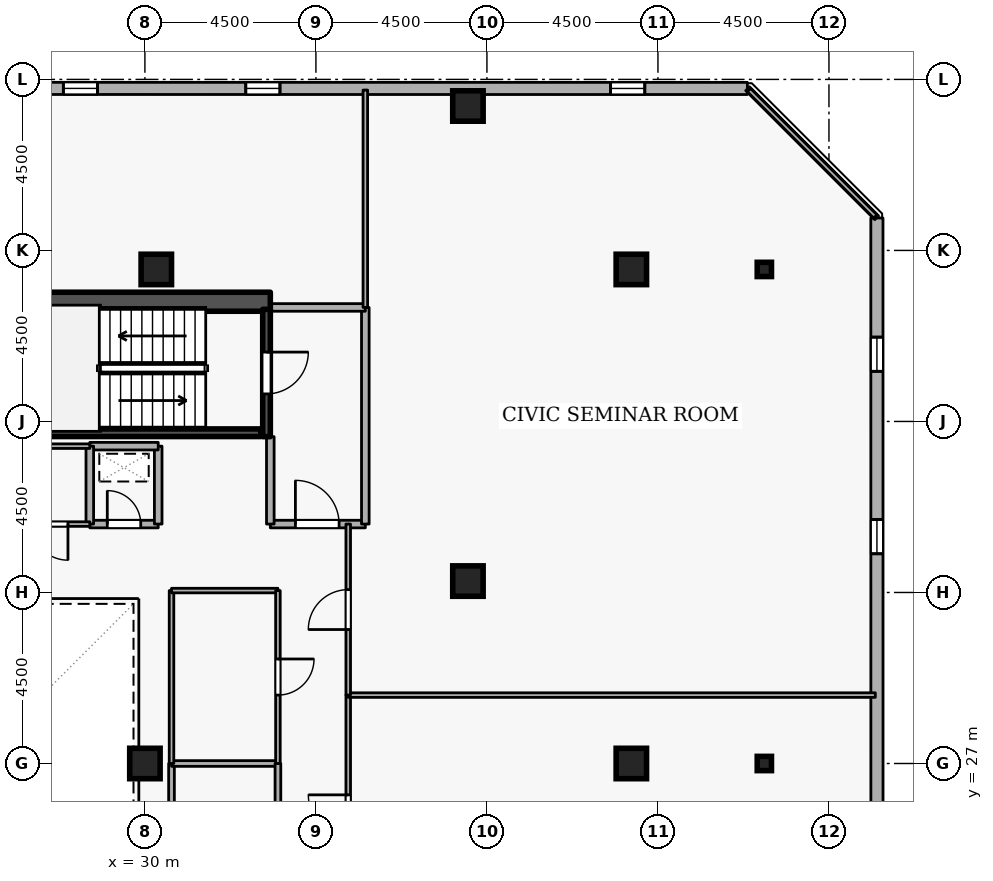
"""IFC4 building model, lengths in metres.
Left out: names, types, materials, properties, quantities, classifications, styles, units other than length and angle.
Written with IfcOpenShell. Run it as: python <this file> out.ifc"""

import sys

from ifc_helpers import new_model, si_unit, direction, frame, frame_2d, origin, origin_2d, place, context, subcontext, project, spatial, rectangle, i_section, extrude, element, fill, save


model = new_model("IFC4")
c1 = context("Model", 3, precision=1e-05, world=origin(), true_north=direction((0.0, 1.0)))
c2 = subcontext(c1, "Body", "Model", "MODEL_VIEW")
j1 = project(units=[si_unit("LENGTHUNIT", "METRE"), si_unit("PLANEANGLEUNIT", "RADIAN")], contexts=[c1])
p1 = place(None, origin())
s1 = spatial("IfcSite", under=j1, at=p1, CompositionType="ELEMENT")
p2 = place(p1, origin())
s2 = spatial("IfcBuilding", under=s1, at=p2, CompositionType="ELEMENT")
p3 = place(p2, frame((0.0, 0.0, 265.5)))
s3 = spatial("IfcBuildingStorey", under=s2, at=p3, CompositionType="ELEMENT", Elevation=265.5)
p4 = place(p3, frame((17.7, 39.15, 0.0), z_axis=(0.0, 0.0, 1.0), x_axis=(1.0, 0.0, 0.0)))
e1 = element("IfcWall", 1, at=p4, inside=s3, PredefinedType="SHEAR", context=c2, shape_type="SweptSolid", body=[
    extrude(rectangle(XDim=15.6, YDim=0.5, at=frame_2d((7.8, 0.0))), origin(), (0.0, 0.0, 1.0), 3.6),
])
for number, where, z_axis, x_axis in (
    (2, (42.8, 27.0, 0.0), (0.0, 0.0, 1.0), (1.0, 0.0, 0.0)),
    (3, (42.8, 40.0, 0.0), (0.0, 0.0, 1.0), (1.0, 0.0, 0.0)),
    (4, (38.5, 44.3, 0.0), (0.0, 0.0, 1.0), (1.0, 0.0, 0.0)),
    (5, (38.5, 31.8, 0.0), (0.0, 0.0, 1.0), (1.0, 0.0, 0.0)),
    (6, (30.3, 40.0, 0.0), (0.0, 0.0, 1.0), (1.0, 0.0, 0.0)),
    (7, (30.0, 27.0, 0.0), (0.0, 0.0, 1.0), (1.0, 0.0, 0.0)),
):
    element("IfcColumn", number, at=place(p3, frame(where, z_axis=z_axis, x_axis=x_axis)), inside=s3, PredefinedType="COLUMN", context=c2, shape_type="SweptSolid", body=[
        extrude(rectangle(XDim=0.8, YDim=0.8, at=origin_2d()), origin(), (0.0, 0.0, 1.0), 3.6),
    ])
for number, where, z_axis, x_axis in (
    (8, (46.3, 27.0, 0.0), (0.0, 0.0, 1.0), (1.0, 0.0, 0.0)),
    (9, (46.3, 40.0, 0.0), (0.0, 0.0, 1.0), (1.0, 0.0, 0.0)),
):
    element("IfcColumn", number, at=place(p3, frame(where, z_axis=z_axis, x_axis=x_axis)), inside=s3, PredefinedType="COLUMN", context=c2, shape_type="SweptSolid", body=[
        extrude(i_section(OverallWidth=0.375, OverallDepth=0.375, WebThickness=0.017, FlangeThickness=0.027, FilletRadius=0.015, at=origin_2d()), origin(), (0.0, 0.0, 1.0), 3.6),
    ])
p5 = place(p3, frame((49.265, 5.819, 0.0), z_axis=(0.0, 0.0, 1.0), x_axis=(-7.5574884e-05, 0.999999997144, 0.0)))
e10 = element("IfcWall", 10, at=p5, inside=s3, PredefinedType="STANDARD", context=c2, shape_type="SweptSolid", body=[
    extrude(rectangle(XDim=35.535, YDim=0.32, at=frame_2d((17.768, 0.0))), origin(), (0.0, 0.0, 1.0), 2.7),
])
p6 = place(p5, frame((2.7, 0.0, 0.72)))
e11 = element("IfcOpeningElement", 11, at=p6, cuts=e10, PredefinedType="OPENING", context=c2, shape_type="SweptSolid", body=[
    extrude(rectangle(XDim=0.9, YDim=1.75, at=frame_2d((0.45, 0.875))), frame((0.0, 0.17, 0.0), z_axis=(0.0, -1.0, 0.0), x_axis=(1.0, 0.0, 0.0)), (0.0, 0.0, 1.0), 0.34),
])
p7 = place(p5, frame((7.5, 0.0, 0.72)))
e12 = element("IfcOpeningElement", 12, at=p7, cuts=e10, PredefinedType="OPENING", context=c2, shape_type="SweptSolid", body=[
    extrude(rectangle(XDim=0.9, YDim=1.75, at=frame_2d((0.45, 0.875))), frame((0.0, 0.17, 0.0), z_axis=(0.0, -1.0, 0.0), x_axis=(1.0, 0.0, 0.0)), (0.0, 0.0, 1.0), 0.34),
])
p8 = place(p5, frame((12.3, 0.0, 0.72)))
e13 = element("IfcOpeningElement", 13, at=p8, cuts=e10, PredefinedType="OPENING", context=c2, shape_type="SweptSolid", body=[
    extrude(rectangle(XDim=0.9, YDim=1.75, at=frame_2d((0.45, 0.875))), frame((0.0, 0.17, 0.0), z_axis=(0.0, -1.0, 0.0), x_axis=(1.0, 0.0, 0.0)), (0.0, 0.0, 1.0), 0.34),
])
p9 = place(p5, frame((17.1, 0.0, 0.72)))
e14 = element("IfcOpeningElement", 14, at=p9, cuts=e10, PredefinedType="OPENING", context=c2, shape_type="SweptSolid", body=[
    extrude(rectangle(XDim=0.9, YDim=1.75, at=frame_2d((0.45, 0.875))), frame((0.0, 0.17, 0.0), z_axis=(0.0, -1.0, 0.0), x_axis=(1.0, 0.0, 0.0)), (0.0, 0.0, 1.0), 0.34),
])
p10 = place(p5, frame((26.7, 0.0, 0.72)))
e15 = element("IfcOpeningElement", 15, at=p10, cuts=e10, PredefinedType="OPENING", context=c2, shape_type="SweptSolid", body=[
    extrude(rectangle(XDim=0.9, YDim=1.75, at=frame_2d((0.45, 0.875))), frame((0.0, 0.17, 0.0), z_axis=(0.0, -1.0, 0.0), x_axis=(1.0, 0.0, 0.0)), (0.0, 0.0, 1.0), 0.34),
])
p11 = place(p5, frame((31.5, 0.0, 0.72)))
e16 = element("IfcOpeningElement", 16, at=p11, cuts=e10, PredefinedType="OPENING", context=c2, shape_type="SweptSolid", body=[
    extrude(rectangle(XDim=0.9, YDim=1.75, at=frame_2d((0.45, 0.875))), frame((0.0, 0.17, 0.0), z_axis=(0.0, -1.0, 0.0), x_axis=(1.0, 0.0, 0.0)), (0.0, 0.0, 1.0), 0.34),
])
p12 = place(p3, frame((45.854, 44.762, 0.0), z_axis=(0.0, 0.0, 1.0), x_axis=(-0.999999997144, 7.5574884e-05, 0.0)))
e17 = element("IfcWall", 17, at=p12, inside=s3, PredefinedType="STANDARD", context=c2, shape_type="SweptSolid", body=[
    extrude(rectangle(XDim=35.535, YDim=0.32, at=frame_2d((17.768, 0.0))), origin(), (0.0, 0.0, 1.0), 2.7),
])
p13 = place(p12, frame((2.7, 0.0, 0.72)))
e18 = element("IfcOpeningElement", 18, at=p13, cuts=e17, PredefinedType="OPENING", context=c2, shape_type="SweptSolid", body=[
    extrude(rectangle(XDim=0.9, YDim=1.75, at=frame_2d((0.45, 0.875))), frame((0.0, 0.17, 0.0), z_axis=(0.0, -1.0, 0.0), x_axis=(1.0, 0.0, 0.0)), (0.0, 0.0, 1.0), 0.34),
])
p14 = place(p12, frame((12.3, 0.0, 0.72)))
e19 = element("IfcOpeningElement", 19, at=p14, cuts=e17, PredefinedType="OPENING", context=c2, shape_type="SweptSolid", body=[
    extrude(rectangle(XDim=0.9, YDim=1.75, at=frame_2d((0.45, 0.875))), frame((0.0, 0.17, 0.0), z_axis=(0.0, -1.0, 0.0), x_axis=(1.0, 0.0, 0.0)), (0.0, 0.0, 1.0), 0.34),
])
p15 = place(p12, frame((17.1, 0.0, 0.72)))
e20 = element("IfcOpeningElement", 20, at=p15, cuts=e17, PredefinedType="OPENING", context=c2, shape_type="SweptSolid", body=[
    extrude(rectangle(XDim=0.9, YDim=1.75, at=frame_2d((0.45, 0.875))), frame((0.0, 0.17, 0.0), z_axis=(0.0, -1.0, 0.0), x_axis=(1.0, 0.0, 0.0)), (0.0, 0.0, 1.0), 0.34),
])
p16 = place(p12, frame((21.9, 0.0, 0.72)))
e21 = element("IfcOpeningElement", 21, at=p16, cuts=e17, PredefinedType="OPENING", context=c2, shape_type="SweptSolid", body=[
    extrude(rectangle(XDim=0.9, YDim=1.75, at=frame_2d((0.45, 0.875))), frame((0.0, 0.17, 0.0), z_axis=(0.0, -1.0, 0.0), x_axis=(1.0, 0.0, 0.0)), (0.0, 0.0, 1.0), 0.34),
])
p17 = place(p12, frame((26.7, 0.0, 0.72)))
e22 = element("IfcOpeningElement", 22, at=p17, cuts=e17, PredefinedType="OPENING", context=c2, shape_type="SweptSolid", body=[
    extrude(rectangle(XDim=0.9, YDim=1.75, at=frame_2d((0.45, 0.875))), frame((0.0, 0.17, 0.0), z_axis=(0.0, -1.0, 0.0), x_axis=(1.0, 0.0, 0.0)), (0.0, 0.0, 1.0), 0.34),
])
p18 = place(p3, frame((33.2, 38.95, 0.0), z_axis=(0.0, 0.0, 1.0), x_axis=(0.0, -1.0, 0.0)))
e23 = element("IfcWall", 23, at=p18, inside=s3, PredefinedType="SHEAR", context=c2, shape_type="SweptSolid", body=[
    extrude(rectangle(XDim=3.35, YDim=0.2, at=frame_2d((1.675, 0.0))), origin(), (0.0, 0.0, 1.0), 3.6),
])
p19 = place(p18, frame((1.125, 0.0, 0.0)))
e24 = element("IfcOpeningElement", 24, at=p19, cuts=e23, PredefinedType="OPENING", context=c2, shape_type="SweptSolid", body=[
    extrude(rectangle(XDim=1.1, YDim=2.1, at=frame_2d((0.55, 1.05))), frame((0.0, 0.11, 0.0), z_axis=(0.0, -1.0, 0.0), x_axis=(1.0, 0.0, 0.0)), (0.0, 0.0, 1.0), 0.22),
])
p20 = place(p3, frame((25.95, 35.703, 0.0), z_axis=(0.0, 0.0, 1.0), x_axis=(1.0, 0.0, 0.0)))
e25 = element("IfcWall", 25, at=p20, inside=s3, PredefinedType="SHEAR", context=c2, shape_type="SweptSolid", body=[
    extrude(rectangle(XDim=7.1, YDim=0.2, at=frame_2d((3.55, 0.0))), origin(), (0.0, 0.0, 1.0), 3.6),
])
p21 = place(p3, frame((33.3, 33.3, 0.0), z_axis=(0.0, 0.0, 1.0), x_axis=(1.0, 0.0, 0.0)))
e26 = element("IfcWall", 26, at=p21, inside=s3, PredefinedType="STANDARD", context=c2, shape_type="SweptSolid", body=[
    extrude(rectangle(XDim=2.5, YDim=0.2, at=frame_2d((1.25, 0.0))), origin(), (0.0, 0.0, 1.0), 3.34),
])
p22 = place(p21, frame((0.66, 0.0, 0.0)))
e27 = element("IfcOpeningElement", 27, at=p22, cuts=e26, PredefinedType="OPENING", context=c2, shape_type="SweptSolid", body=[
    extrude(rectangle(XDim=1.15, YDim=2.1, at=frame_2d((0.575, 1.05))), frame((0.0, 0.11, 0.0), z_axis=(0.0, -1.0, 0.0), x_axis=(1.0, 0.0, 0.0)), (0.0, 0.0, 1.0), 0.22),
])
p23 = place(p3, frame((35.8, 33.3, 0.0), z_axis=(0.0, 0.0, 1.0), x_axis=(0.0, 1.0, 0.0)))
e28 = element("IfcWall", 28, at=p23, inside=s3, PredefinedType="STANDARD", context=c2, shape_type="SweptSolid", body=[
    extrude(rectangle(XDim=5.7, YDim=0.2, at=frame_2d((2.85, 0.0))), origin(), (0.0, 0.0, 1.0), 3.34),
])
p24 = place(p3, frame((35.8, 39.0, 0.0), z_axis=(0.0, 0.0, 1.0), x_axis=(-1.0, 0.0, 0.0)))
e29 = element("IfcWall", 29, at=p24, inside=s3, PredefinedType="STANDARD", context=c2, shape_type="SweptSolid", body=[
    extrude(rectangle(XDim=2.5, YDim=0.2, at=frame_2d((1.25, 0.0))), origin(), (0.0, 0.0, 1.0), 3.34),
])
p25 = place(p3, frame((33.3, 35.6, 0.0), z_axis=(0.0, 0.0, 1.0), x_axis=(0.0, -1.0, 0.0)))
e30 = element("IfcWall", 30, at=p25, inside=s3, PredefinedType="STANDARD", context=c2, shape_type="SweptSolid", body=[
    extrude(rectangle(XDim=2.3, YDim=0.2, at=frame_2d((1.15, 0.0))), origin(), (0.0, 0.0, 1.0), 2.545),
])
p26 = place(p3, frame((28.55, 33.3, 0.0), z_axis=(0.0, 0.0, 1.0), x_axis=(1.0, 0.0, 0.0)))
e31 = element("IfcWall", 31, at=p26, inside=s3, PredefinedType="STANDARD", context=c2, shape_type="SweptSolid", body=[
    extrude(rectangle(XDim=1.8, YDim=0.2, at=frame_2d((0.9, 0.0))), origin(), (0.0, 0.0, 1.0), 3.34),
])
p27 = place(p26, frame((0.46, 0.0, 0.0)))
e32 = element("IfcOpeningElement", 32, at=p27, cuts=e31, PredefinedType="OPENING", context=c2, shape_type="SweptSolid", body=[
    extrude(rectangle(XDim=0.88, YDim=2.04, at=frame_2d((0.44, 1.02))), frame((0.0, 0.11, 0.0), z_axis=(0.0, -1.0, 0.0), x_axis=(1.0, 0.0, 0.0)), (0.0, 0.0, 1.0), 0.22),
])
p28 = place(p3, frame((30.35, 33.3, 0.0), z_axis=(0.0, 0.0, 1.0), x_axis=(0.0, 1.0, 0.0)))
e33 = element("IfcWall", 33, at=p28, inside=s3, PredefinedType="STANDARD", context=c2, shape_type="SweptSolid", body=[
    extrude(rectangle(XDim=2.05, YDim=0.2, at=frame_2d((1.025, 0.0))), origin(), (0.0, 0.0, 1.0), 3.34),
])
p29 = place(p3, frame((30.35, 35.35, 0.0), z_axis=(0.0, 0.0, 1.0), x_axis=(-1.0, 0.0, 0.0)))
e34 = element("IfcWall", 34, at=p29, inside=s3, PredefinedType="STANDARD", context=c2, shape_type="SweptSolid", body=[
    extrude(rectangle(XDim=1.8, YDim=0.2, at=frame_2d((0.9, 0.0))), origin(), (0.0, 0.0, 1.0), 3.34),
])
p30 = place(p3, frame((28.55, 35.35, 0.0), z_axis=(0.0, 0.0, 1.0), x_axis=(0.0, -1.0, 0.0)))
e35 = element("IfcWall", 35, at=p30, inside=s3, PredefinedType="STANDARD", context=c2, shape_type="SweptSolid", body=[
    extrude(rectangle(XDim=2.05, YDim=0.2, at=frame_2d((1.025, 0.0))), origin(), (0.0, 0.0, 1.0), 3.34),
])
p31 = place(p3, frame((26.45, 35.35, 0.0), z_axis=(0.0, 0.0, 1.0), x_axis=(1.0, 0.0, 0.0)))
e36 = element("IfcWall", 36, at=p31, inside=s3, PredefinedType="PARTITIONING", context=c2, shape_type="SweptSolid", body=[
    extrude(rectangle(XDim=2.1, YDim=0.12, at=frame_2d((1.05, 0.0))), origin(), (0.0, 0.0, 1.0), 3.34),
])
p32 = place(p3, frame((28.55, 33.3, 0.0), z_axis=(0.0, 0.0, 1.0), x_axis=(-1.0, 0.0, 0.0)))
e37 = element("IfcWall", 37, at=p32, inside=s3, PredefinedType="PARTITIONING", context=c2, shape_type="SweptSolid", body=[
    extrude(rectangle(XDim=2.1, YDim=0.12, at=frame_2d((1.05, 0.0))), origin(), (0.0, 0.0, 1.0), 3.34),
])
p33 = place(p32, frame((0.575, 0.0, 0.0)))
e38 = element("IfcOpeningElement", 38, at=p33, cuts=e37, PredefinedType="OPENING", context=c2, shape_type="SweptSolid", body=[
    extrude(rectangle(XDim=0.95, YDim=2.1, at=frame_2d((0.475, 1.05))), frame((0.0, 0.07, 0.0), z_axis=(0.0, -1.0, 0.0), x_axis=(1.0, 0.0, 0.0)), (0.0, 0.0, 1.0), 0.14),
])
p34 = place(p3, frame((35.35, 22.5, 0.0), z_axis=(0.0, 0.0, 1.0), x_axis=(0.0, 1.0, 0.0)))
e39 = element("IfcWall", 39, at=p34, inside=s3, PredefinedType="PARTITIONING", context=c2, shape_type="SweptSolid", body=[
    extrude(rectangle(XDim=6.3, YDim=0.12, at=frame_2d((3.15, 0.0))), origin(), (0.0, 0.0, 1.0), 3.34),
])
p35 = place(p34, frame((2.625, 0.0, 0.0)))
e40 = element("IfcOpeningElement", 40, at=p35, cuts=e39, PredefinedType="OPENING", context=c2, shape_type="SweptSolid", body=[
    extrude(rectangle(XDim=1.05, YDim=2.1, at=frame_2d((0.525, 1.05))), frame((0.0, 0.07, 0.0), z_axis=(0.0, -1.0, 0.0), x_axis=(1.0, 0.0, 0.0)), (0.0, 0.0, 1.0), 0.14),
])
p36 = place(p3, frame((35.35, 28.8, 0.0), z_axis=(0.0, 0.0, 1.0), x_axis=(1.0, 0.0, 0.0)))
e41 = element("IfcWall", 41, at=p36, inside=s3, PredefinedType="PARTITIONING", context=c2, shape_type="SweptSolid", body=[
    extrude(rectangle(XDim=13.87, YDim=0.12, at=frame_2d((6.935, 0.0))), origin(), (0.0, 0.0, 1.0), 3.34),
])
p37 = place(p3, frame((35.8, 39.0, 0.0), z_axis=(0.0, 0.0, 1.0), x_axis=(0.0, 1.0, 0.0)))
e42 = element("IfcWall", 42, at=p37, inside=s3, PredefinedType="PARTITIONING", context=c2, shape_type="SweptSolid", body=[
    extrude(rectangle(XDim=5.72, YDim=0.12, at=frame_2d((2.86, 0.0))), origin(), (0.0, 0.0, 1.0), 3.34),
])
p38 = place(p3, frame((45.894, 44.72, 0.0), z_axis=(0.0, 0.0, 1.0), x_axis=(0.707106781187, -0.707106781187, 0.0)))
e43 = element("IfcWall", 43, at=p38, inside=s3, PredefinedType="PARTITIONING", context=c2, shape_type="SweptSolid", body=[
    extrude(rectangle(XDim=4.703, YDim=0.12, at=frame_2d((2.352, 0.0))), origin(), (0.0, 0.0, 1.0), 3.34),
])
p39 = place(p3, frame((35.35, 28.8, 0.0), z_axis=(0.0, 0.0, 1.0), x_axis=(0.0, 1.0, 0.0)))
e44 = element("IfcWall", 44, at=p39, inside=s3, PredefinedType="PARTITIONING", context=c2, shape_type="SweptSolid", body=[
    extrude(rectangle(XDim=4.5, YDim=0.12, at=frame_2d((2.25, 0.0))), origin(), (0.0, 0.0, 1.0), 3.34),
])
p40 = place(p39, frame((1.725, 0.0, 0.0)))
e45 = element("IfcOpeningElement", 45, at=p40, cuts=e44, PredefinedType="OPENING", context=c2, shape_type="SweptSolid", body=[
    extrude(rectangle(XDim=1.05, YDim=2.1, at=frame_2d((0.525, 1.05))), frame((0.0, 0.07, 0.0), z_axis=(0.0, -1.0, 0.0), x_axis=(1.0, 0.0, 0.0)), (0.0, 0.0, 1.0), 0.14),
])
p41 = place(p3, frame((30.7, 22.45, 0.0), z_axis=(0.0, 0.0, 1.0), x_axis=(0.0, 1.0, 0.0)))
e46 = element("IfcWall", 46, at=p41, inside=s3, PredefinedType="PARTITIONING", context=c2, shape_type="SweptSolid", body=[
    extrude(rectangle(XDim=4.55, YDim=0.15, at=frame_2d((2.275, 0.0))), origin(), (0.0, 0.0, 1.0), 3.34),
])
p42 = place(p3, frame((30.7, 27.0, 0.0), z_axis=(0.0, 0.0, 1.0), x_axis=(1.0, 0.0, 0.0)))
e47 = element("IfcWall", 47, at=p42, inside=s3, PredefinedType="PARTITIONING", context=c2, shape_type="SweptSolid", body=[
    extrude(rectangle(XDim=2.8, YDim=0.15, at=frame_2d((1.4, 0.0))), origin(), (0.0, 0.0, 1.0), 3.34),
])
p43 = place(p3, frame((33.5, 27.0, 0.0), z_axis=(0.0, 0.0, 1.0), x_axis=(0.0, -1.0, 0.0)))
e48 = element("IfcWall", 48, at=p43, inside=s3, PredefinedType="PARTITIONING", context=c2, shape_type="SweptSolid", body=[
    extrude(rectangle(XDim=4.55, YDim=0.15, at=frame_2d((2.275, 0.0))), origin(), (0.0, 0.0, 1.0), 3.34),
])
p44 = place(p43, frame((1.625, 0.0, 0.0)))
e49 = element("IfcOpeningElement", 49, at=p44, cuts=e48, PredefinedType="OPENING", context=c2, shape_type="SweptSolid", body=[
    extrude(rectangle(XDim=1.3, YDim=2.12, at=frame_2d((0.65, 1.06))), frame((0.0, 0.085, 0.0), z_axis=(0.0, -1.0, 0.0), x_axis=(1.0, 0.0, 0.0)), (0.0, 0.0, 1.0), 0.17),
])
p45 = place(p3, frame((30.7, 27.0, 0.0), z_axis=(0.0, 0.0, 1.0), x_axis=(0.0, 1.0, 0.0)))
e50 = element("IfcWall", 50, at=p45, inside=s3, PredefinedType="PARTITIONING", context=c2, shape_type="SweptSolid", body=[
    extrude(rectangle(XDim=4.55, YDim=0.12, at=frame_2d((2.275, 0.0))), origin(), (0.0, 0.0, 1.0), 3.34),
])
p46 = place(p3, frame((30.7, 31.55, 0.0), z_axis=(0.0, 0.0, 1.0), x_axis=(1.0, 0.0, 0.0)))
e51 = element("IfcWall", 51, at=p46, inside=s3, PredefinedType="PARTITIONING", context=c2, shape_type="SweptSolid", body=[
    extrude(rectangle(XDim=2.8, YDim=0.12, at=frame_2d((1.4, 0.0))), origin(), (0.0, 0.0, 1.0), 3.34),
])
p47 = place(p3, frame((33.5, 31.55, 0.0), z_axis=(0.0, 0.0, 1.0), x_axis=(0.0, -1.0, 0.0)))
e52 = element("IfcWall", 52, at=p47, inside=s3, PredefinedType="PARTITIONING", context=c2, shape_type="SweptSolid", body=[
    extrude(rectangle(XDim=4.55, YDim=0.12, at=frame_2d((2.275, 0.0))), origin(), (0.0, 0.0, 1.0), 3.34),
])
p48 = place(p47, frame((1.8, 0.0, 0.0)))
e53 = element("IfcOpeningElement", 53, at=p48, cuts=e52, PredefinedType="OPENING", context=c2, shape_type="SweptSolid", body=[
    extrude(rectangle(XDim=0.95, YDim=2.1, at=frame_2d((0.475, 1.05))), frame((0.0, 0.07, 0.0), z_axis=(0.0, -1.0, 0.0), x_axis=(1.0, 0.0, 0.0)), (0.0, 0.0, 1.0), 0.14),
])
p49 = place(p10, origin())
e54 = element("IfcWindow", 54, at=p49, inside=s3, PartitioningType="SINGLE_PANEL", PredefinedType="WINDOW", context=c2, shape_type="SweptSolid", body=[
    extrude(rectangle(XDim=0.9, YDim=1.75, at=frame_2d((0.45, 0.875))), frame((0.0, 0.03, 0.0), z_axis=(0.0, -1.0, 0.0), x_axis=(1.0, 0.0, 0.0)), (0.0, 0.0, 1.0), 0.06),
])
fill(e15, e54)
p50 = place(p11, origin())
e55 = element("IfcWindow", 55, at=p50, inside=s3, PartitioningType="SINGLE_PANEL", PredefinedType="WINDOW", context=c2, shape_type="SweptSolid", body=[
    extrude(rectangle(XDim=0.9, YDim=1.75, at=frame_2d((0.45, 0.875))), frame((0.0, 0.03, 0.0), z_axis=(0.0, -1.0, 0.0), x_axis=(1.0, 0.0, 0.0)), (0.0, 0.0, 1.0), 0.06),
])
fill(e16, e55)
p51 = place(p13, origin())
e56 = element("IfcWindow", 56, at=p51, inside=s3, PartitioningType="SINGLE_PANEL", PredefinedType="WINDOW", context=c2, shape_type="SweptSolid", body=[
    extrude(rectangle(XDim=0.9, YDim=1.75, at=frame_2d((0.45, 0.875))), frame((0.0, 0.03, 0.0), z_axis=(0.0, -1.0, 0.0), x_axis=(1.0, 0.0, 0.0)), (0.0, 0.0, 1.0), 0.06),
])
fill(e18, e56)
p52 = place(p14, origin())
e57 = element("IfcWindow", 57, at=p52, inside=s3, PartitioningType="SINGLE_PANEL", PredefinedType="WINDOW", context=c2, shape_type="SweptSolid", body=[
    extrude(rectangle(XDim=0.9, YDim=1.75, at=frame_2d((0.45, 0.875))), frame((0.0, 0.03, 0.0), z_axis=(0.0, -1.0, 0.0), x_axis=(1.0, 0.0, 0.0)), (0.0, 0.0, 1.0), 0.06),
])
fill(e19, e57)
p53 = place(p15, origin())
e58 = element("IfcWindow", 58, at=p53, inside=s3, PartitioningType="SINGLE_PANEL", PredefinedType="WINDOW", context=c2, shape_type="SweptSolid", body=[
    extrude(rectangle(XDim=0.9, YDim=1.75, at=frame_2d((0.45, 0.875))), frame((0.0, 0.03, 0.0), z_axis=(0.0, -1.0, 0.0), x_axis=(1.0, 0.0, 0.0)), (0.0, 0.0, 1.0), 0.06),
])
fill(e20, e58)
p54 = place(p19, origin())
e59 = element("IfcDoor", 59, at=p54, inside=s3, OperationType="SINGLE_SWING_LEFT", PredefinedType="DOOR", context=c2, shape_type="SweptSolid", body=[
    extrude(rectangle(XDim=1.1, YDim=2.1, at=frame_2d((0.55, 1.05))), frame((0.0, 0.025, 0.0), z_axis=(0.0, -1.0, 0.0), x_axis=(1.0, 0.0, 0.0)), (0.0, 0.0, 1.0), 0.05),
])
fill(e24, e59)
p55 = place(p22, origin())
e60 = element("IfcDoor", 60, at=p55, inside=s3, OperationType="SINGLE_SWING_LEFT", PredefinedType="DOOR", context=c2, shape_type="SweptSolid", body=[
    extrude(rectangle(XDim=1.15, YDim=2.1, at=frame_2d((0.575, 1.05))), frame((0.0, 0.025, 0.0), z_axis=(0.0, -1.0, 0.0), x_axis=(1.0, 0.0, 0.0)), (0.0, 0.0, 1.0), 0.05),
])
fill(e27, e60)
p56 = place(p27, origin())
e61 = element("IfcDoor", 61, at=p56, inside=s3, OperationType="SINGLE_SWING_LEFT", PredefinedType="DOOR", context=c2, shape_type="SweptSolid", body=[
    extrude(rectangle(XDim=0.88, YDim=2.04, at=frame_2d((0.44, 1.02))), frame((0.0, 0.025, 0.0), z_axis=(0.0, -1.0, 0.0), x_axis=(1.0, 0.0, 0.0)), (0.0, 0.0, 1.0), 0.05),
])
fill(e32, e61)
p57 = place(p33, origin())
e62 = element("IfcDoor", 62, at=p57, inside=s3, OperationType="SINGLE_SWING_LEFT", PredefinedType="DOOR", context=c2, shape_type="SweptSolid", body=[
    extrude(rectangle(XDim=0.95, YDim=2.1, at=frame_2d((0.475, 1.05))), frame((0.0, 0.025, 0.0), z_axis=(0.0, -1.0, 0.0), x_axis=(1.0, 0.0, 0.0)), (0.0, 0.0, 1.0), 0.05),
])
fill(e38, e62)
p58 = place(p35, origin())
e63 = element("IfcDoor", 63, at=p58, inside=s3, OperationType="SINGLE_SWING_RIGHT", PredefinedType="DOOR", context=c2, shape_type="SweptSolid", body=[
    extrude(rectangle(XDim=1.05, YDim=2.1, at=frame_2d((0.525, 1.05))), frame((0.0, 0.025, 0.0), z_axis=(0.0, -1.0, 0.0), x_axis=(1.0, 0.0, 0.0)), (0.0, 0.0, 1.0), 0.05),
])
fill(e40, e63)
p59 = place(p40, origin())
e64 = element("IfcDoor", 64, at=p59, inside=s3, OperationType="SINGLE_SWING_LEFT", PredefinedType="DOOR", context=c2, shape_type="SweptSolid", body=[
    extrude(rectangle(XDim=1.05, YDim=2.1, at=frame_2d((0.525, 1.05))), frame((0.0, 0.025, 0.0), z_axis=(0.0, -1.0, 0.0), x_axis=(1.0, 0.0, 0.0)), (0.0, 0.0, 1.0), 0.05),
])
fill(e45, e64)
p60 = place(p48, origin())
e65 = element("IfcDoor", 65, at=p60, inside=s3, OperationType="SINGLE_SWING_LEFT", PredefinedType="DOOR", context=c2, shape_type="SweptSolid", body=[
    extrude(rectangle(XDim=0.95, YDim=2.1, at=frame_2d((0.475, 1.05))), frame((0.0, 0.025, 0.0), z_axis=(0.0, -1.0, 0.0), x_axis=(1.0, 0.0, 0.0)), (0.0, 0.0, 1.0), 0.05),
])
fill(e53, e65)
save(model, sys.argv[1])
